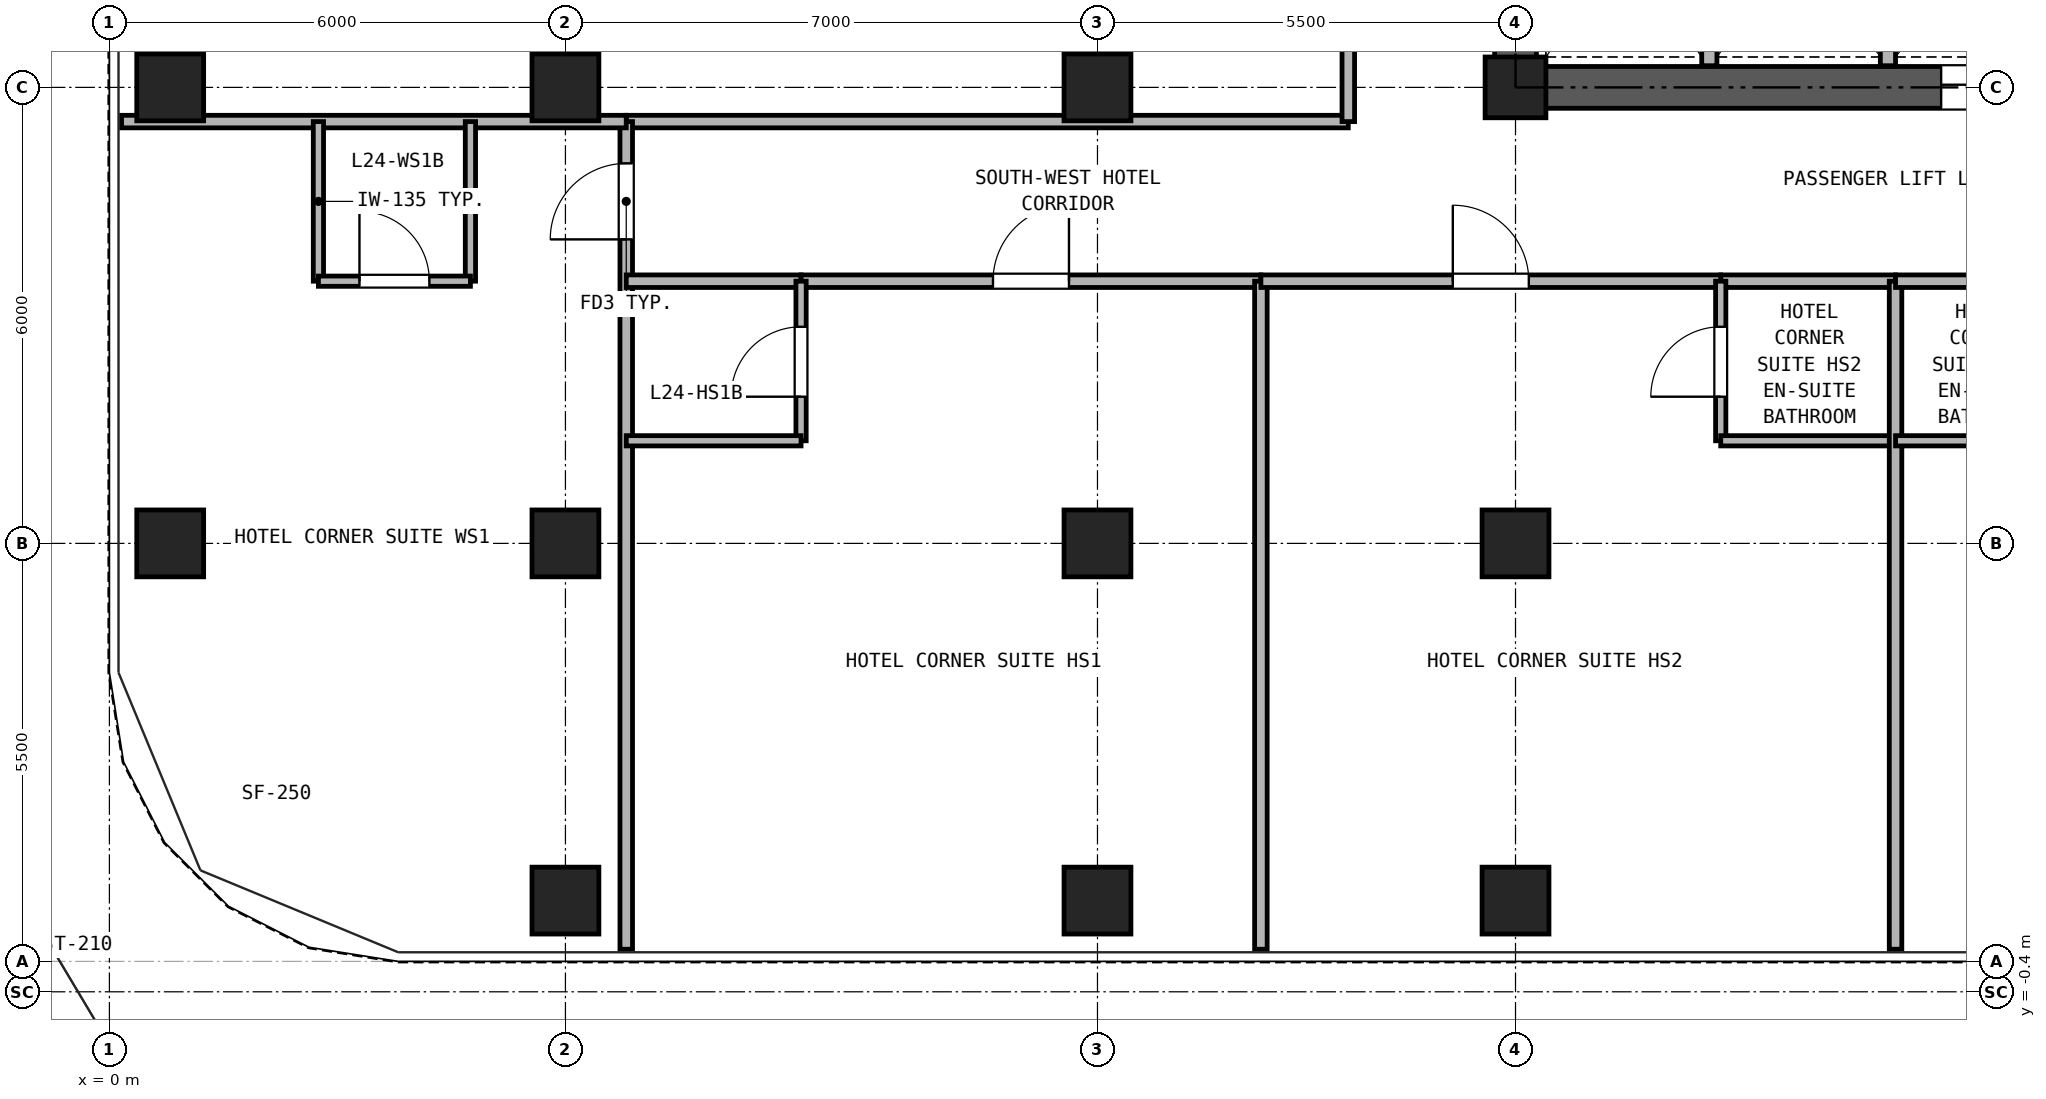
"""IFC4 building model, lengths in metres.
Left out: names, types, materials, properties, quantities, classifications, styles, units other than length and angle.
Written with IfcOpenShell. Run it as: python <this file> out.ifc"""

import sys

from ifc_helpers import new_model, si_unit, direction, frame, frame_2d, origin, origin_2d, place, context, subcontext, project, spatial, rectangle, hollow_rectangle, extrude, source, transform, mapped, element, fill, save


model = new_model("IFC4")
c1 = context("Model", 3, precision=1e-05, world=origin(), true_north=direction((0.0, 1.0)))
c2 = subcontext(c1, "Body", "Model", "MODEL_VIEW")
j1 = project(units=[si_unit("LENGTHUNIT", "METRE"), si_unit("PLANEANGLEUNIT", "RADIAN")], contexts=[c1])
p1 = place(None, origin())
s1 = spatial("IfcSite", under=j1, at=p1, CompositionType="ELEMENT")
p2 = place(p1, origin())
s2 = spatial("IfcBuilding", under=s1, at=p2, CompositionType="ELEMENT")
p3 = place(p2, frame((0.0, 0.0, 92.7)))
s3 = spatial("IfcBuildingStorey", under=s2, at=p3, CompositionType="ELEMENT", Elevation=92.7)
m1 = source(origin(), c2, "Body", "SweptSolid", [
    extrude(hollow_rectangle(XDim=0.88, YDim=0.88, WallThickness=0.05, at=origin_2d()), origin(), (0.0, 0.0, 1.0), 2.95),
])
for number, where, z_axis, x_axis in (
    (1, (6.0, 0.8, 0.0), (0.0, 0.0, 1.0), (1.0, 0.0, 0.0)),
    (2, (13.0, 0.8, 0.0), (0.0, 0.0, 1.0), (1.0, 0.0, 0.0)),
    (3, (18.5, 0.8, 0.0), (0.0, 0.0, 1.0), (1.0, 0.0, 0.0)),
    (4, (0.8, 5.5, 0.0), (0.0, 0.0, 1.0), (1.0, 0.0, 0.0)),
    (5, (0.8, 11.5, 0.0), (0.0, 0.0, 1.0), (1.0, 0.0, 0.0)),
    (6, (6.0, 5.5, 0.0), (0.0, 0.0, 1.0), (1.0, 0.0, 0.0)),
    (7, (6.0, 11.5, 0.0), (0.0, 0.0, 1.0), (1.0, 0.0, 0.0)),
    (8, (13.0, 5.5, 0.0), (0.0, 0.0, 1.0), (1.0, 0.0, 0.0)),
    (9, (13.0, 11.5, 0.0), (0.0, 0.0, 1.0), (1.0, 0.0, 0.0)),
    (10, (18.5, 5.5, 0.0), (0.0, 0.0, 1.0), (1.0, 0.0, 0.0)),
):
    element("IfcColumn", number, at=place(p3, frame(where, z_axis=z_axis, x_axis=x_axis)), inside=s3, PredefinedType="COLUMN", context=c2, shape_type="MappedRepresentation", body=[
        mapped(m1, transform((0.0, 0.0, 0.0), x_axis=(1.0, 0.0, 0.0), y_axis=(0.0, 1.0, 0.0), z_axis=(0.0, 0.0, 1.0), scale=1.0)),
    ])
m2 = source(origin(), c2, "Body", "SweptSolid", [
    extrude(hollow_rectangle(XDim=0.8, YDim=0.8, WallThickness=0.045, at=origin_2d()), origin(), (0.0, 0.0, 1.0), 2.95),
])
p4 = place(p3, frame((18.5, 11.5, 0.0), z_axis=(0.0, 0.0, 1.0), x_axis=(1.0, 0.0, 0.0)))
e11 = element("IfcColumn", 11, at=p4, inside=s3, PredefinedType="COLUMN", context=c2, shape_type="MappedRepresentation", body=[
    mapped(m2, transform((0.0, 0.0, 0.0), x_axis=(1.0, 0.0, 0.0), y_axis=(0.0, 1.0, 0.0), z_axis=(0.0, 0.0, 1.0), scale=1.0)),
])
p5 = place(p3, frame((18.225, 11.5, 0.0), z_axis=(0.0, 0.0, 1.0), x_axis=(1.0, 0.0, 0.0)))
e12 = element("IfcWall", 12, at=p5, inside=s3, PredefinedType="SHEAR", context=c2, shape_type="SweptSolid", body=[
    extrude(rectangle(XDim=10.55, YDim=0.55, at=frame_2d((5.275, 0.0))), origin(), (0.0, 0.0, 1.0), 2.95),
])
p6 = place(p5, frame((5.875, 0.0, 0.0)))
e13 = element("IfcOpeningElement", 13, at=p6, cuts=e12, PredefinedType="OPENING", context=c2, shape_type="SweptSolid", body=[
    extrude(rectangle(XDim=1.1, YDim=2.25, at=frame_2d((0.55, 1.125))), frame((0.0, 0.285, 0.0), z_axis=(0.0, -1.0, 0.0), x_axis=(1.0, 0.0, 0.0)), (0.0, 0.0, 1.0), 0.57),
])
p7 = place(p5, frame((8.275, 0.0, 0.0)))
e14 = element("IfcOpeningElement", 14, at=p7, cuts=e12, PredefinedType="OPENING", context=c2, shape_type="SweptSolid", body=[
    extrude(rectangle(XDim=1.1, YDim=2.25, at=frame_2d((0.55, 1.125))), frame((0.0, 0.285, 0.0), z_axis=(0.0, -1.0, 0.0), x_axis=(1.0, 0.0, 0.0)), (0.0, 0.0, 1.0), 0.57),
])
p8 = place(p3, frame((18.5, 11.775, 0.0), z_axis=(0.0, 0.0, 1.0), x_axis=(0.0, 1.0, 0.0)))
e15 = element("IfcWall", 15, at=p8, inside=s3, PredefinedType="SHEAR", context=c2, shape_type="SweptSolid", body=[
    extrude(rectangle(XDim=16.7, YDim=0.55, at=frame_2d((8.35, 0.0))), origin(), (0.0, 0.0, 1.0), 2.95),
])
p9 = place(p8, frame((7.375, 0.0, 0.0)))
e16 = element("IfcOpeningElement", 16, at=p9, cuts=e15, PredefinedType="OPENING", context=c2, shape_type="SweptSolid", body=[
    extrude(rectangle(XDim=1.15, YDim=2.2, at=frame_2d((0.575, 1.1))), frame((0.0, 0.285, 0.0), z_axis=(0.0, -1.0, 0.0), x_axis=(1.0, 0.0, 0.0)), (0.0, 0.0, 1.0), 0.57),
])
for number, where, z_axis, x_axis in (
    (17, (21.05, 11.785, 0.0), (0.0, 0.0, 1.0), (0.0, 1.0, 0.0)),
    (18, (23.4, 11.785, 0.0), (0.0, 0.0, 1.0), (0.0, 1.0, 0.0)),
):
    element("IfcWall", number, at=place(p3, frame(where, z_axis=z_axis, x_axis=x_axis)), inside=s3, PredefinedType="PARTITIONING", context=c2, shape_type="SweptSolid", body=[
        extrude(rectangle(XDim=3.215, YDim=0.2, at=frame_2d((1.607, 0.0))), origin(), (0.0, 0.0, 1.0), 2.95),
    ])
p10 = place(p3, frame((6.8, 11.05, 0.0), z_axis=(0.0, 0.0, 1.0), x_axis=(1.0, 0.0, 0.0)))
e19 = element("IfcWall", 19, at=p10, inside=s3, PredefinedType="PARTITIONING", context=c2, shape_type="SweptSolid", body=[
    extrude(rectangle(XDim=9.5, YDim=0.165, at=frame_2d((4.75, 0.0))), origin(), (0.0, 0.0, 1.0), 2.95),
])
p11 = place(p3, frame((16.3, 11.05, 0.0), z_axis=(0.0, 0.0, 1.0), x_axis=(0.0, 1.0, 0.0)))
e20 = element("IfcWall", 20, at=p11, inside=s3, PredefinedType="PARTITIONING", context=c2, shape_type="SweptSolid", body=[
    extrude(rectangle(XDim=18.25, YDim=0.165, at=frame_2d((9.125, 0.0))), origin(), (0.0, 0.0, 1.0), 2.95),
])
p12 = place(p11, frame((4.062, 0.0, 0.0)))
e21 = element("IfcOpeningElement", 21, at=p12, cuts=e20, PredefinedType="OPENING", context=c2, shape_type="SweptSolid", body=[
    extrude(rectangle(XDim=0.95, YDim=2.15, at=frame_2d((0.475, 1.075))), frame((0.0, 0.093, 0.0), z_axis=(0.0, -1.0, 0.0), x_axis=(1.0, 0.0, 0.0)), (0.0, 0.0, 1.0), 0.185),
])
p13 = place(p11, frame((13.187, 0.0, 0.0)))
e22 = element("IfcOpeningElement", 22, at=p13, cuts=e20, PredefinedType="OPENING", context=c2, shape_type="SweptSolid", body=[
    extrude(rectangle(XDim=0.95, YDim=2.15, at=frame_2d((0.475, 1.075))), frame((0.0, 0.093, 0.0), z_axis=(0.0, -1.0, 0.0), x_axis=(1.0, 0.0, 0.0)), (0.0, 0.0, 1.0), 0.185),
])
p14 = place(p3, frame((6.8, 0.16, 0.0), z_axis=(0.0, 0.0, 1.0), x_axis=(0.0, 1.0, 0.0)))
e23 = element("IfcWall", 23, at=p14, inside=s3, PredefinedType="PARTITIONING", context=c2, shape_type="SweptSolid", body=[
    extrude(rectangle(XDim=10.89, YDim=0.165, at=frame_2d((5.445, 0.0))), origin(), (0.0, 0.0, 1.0), 2.95),
])
p15 = place(p14, frame((9.34, 0.0, 0.0)))
e24 = element("IfcOpeningElement", 24, at=p15, cuts=e23, PredefinedType="OPENING", context=c2, shape_type="SweptSolid", body=[
    extrude(rectangle(XDim=1.0, YDim=2.15, at=frame_2d((0.5, 1.075))), frame((0.0, 0.093, 0.0), z_axis=(0.0, -1.0, 0.0), x_axis=(1.0, 0.0, 0.0)), (0.0, 0.0, 1.0), 0.185),
])
p16 = place(p3, frame((0.16, 11.05, 0.0), z_axis=(0.0, 0.0, 1.0), x_axis=(1.0, 0.0, 0.0)))
e25 = element("IfcWall", 25, at=p16, inside=s3, PredefinedType="PARTITIONING", context=c2, shape_type="SweptSolid", body=[
    extrude(rectangle(XDim=6.64, YDim=0.165, at=frame_2d((3.32, 0.0))), origin(), (0.0, 0.0, 1.0), 2.95),
])
for number, where, z_axis, x_axis in (
    (26, (2.75, 8.95, 0.0), (0.0, 0.0, 1.0), (0.0, 1.0, 0.0)),
    (27, (4.75, 8.95, 0.0), (0.0, 0.0, 1.0), (0.0, 1.0, 0.0)),
):
    element("IfcWall", number, at=place(p3, frame(where, z_axis=z_axis, x_axis=x_axis)), inside=s3, PredefinedType="PARTITIONING", context=c2, shape_type="SweptSolid", body=[
        extrude(rectangle(XDim=2.1, YDim=0.135, at=frame_2d((1.05, 0.0))), origin(), (0.0, 0.0, 1.0), 2.95),
    ])
p17 = place(p3, frame((2.75, 8.95, 0.0), z_axis=(0.0, 0.0, 1.0), x_axis=(1.0, 0.0, 0.0)))
e28 = element("IfcWall", 28, at=p17, inside=s3, PredefinedType="PARTITIONING", context=c2, shape_type="SweptSolid", body=[
    extrude(rectangle(XDim=2.0, YDim=0.135, at=frame_2d((1.0, 0.0))), origin(), (0.0, 0.0, 1.0), 2.95),
])
p18 = place(p17, frame((0.54, 0.0, 0.0)))
e29 = element("IfcOpeningElement", 29, at=p18, cuts=e28, PredefinedType="OPENING", context=c2, shape_type="SweptSolid", body=[
    extrude(rectangle(XDim=0.92, YDim=2.1, at=frame_2d((0.46, 1.05))), frame((0.0, 0.077, 0.0), z_axis=(0.0, -1.0, 0.0), x_axis=(1.0, 0.0, 0.0)), (0.0, 0.0, 1.0), 0.155),
])
p19 = place(p3, frame((6.8, 8.95, 0.0), z_axis=(0.0, 0.0, 1.0), x_axis=(1.0, 0.0, 0.0)))
e30 = element("IfcWall", 30, at=p19, inside=s3, PredefinedType="PARTITIONING", context=c2, shape_type="SweptSolid", body=[
    extrude(rectangle(XDim=2.3, YDim=0.165, at=frame_2d((1.15, 0.0))), origin(), (0.0, 0.0, 1.0), 2.95),
])
p20 = place(p3, frame((9.1, 8.95, 0.0), z_axis=(0.0, 0.0, 1.0), x_axis=(1.0, 0.0, 0.0)))
e31 = element("IfcWall", 31, at=p20, inside=s3, PredefinedType="PARTITIONING", context=c2, shape_type="SweptSolid", body=[
    extrude(rectangle(XDim=6.05, YDim=0.165, at=frame_2d((3.025, 0.0))), origin(), (0.0, 0.0, 1.0), 2.95),
])
p21 = place(p20, frame((2.525, 0.0, 0.0)))
e32 = element("IfcOpeningElement", 32, at=p21, cuts=e31, PredefinedType="OPENING", context=c2, shape_type="SweptSolid", body=[
    extrude(rectangle(XDim=1.0, YDim=2.15, at=frame_2d((0.5, 1.075))), frame((0.0, 0.093, 0.0), z_axis=(0.0, -1.0, 0.0), x_axis=(1.0, 0.0, 0.0)), (0.0, 0.0, 1.0), 0.185),
])
p22 = place(p3, frame((9.1, 6.85, 0.0), z_axis=(0.0, 0.0, 1.0), x_axis=(0.0, 1.0, 0.0)))
e33 = element("IfcWall", 33, at=p22, inside=s3, PredefinedType="PARTITIONING", context=c2, shape_type="SweptSolid", body=[
    extrude(rectangle(XDim=2.1, YDim=0.135, at=frame_2d((1.05, 0.0))), origin(), (0.0, 0.0, 1.0), 2.95),
])
p23 = place(p22, frame((0.58, 0.0, 0.0)))
e34 = element("IfcOpeningElement", 34, at=p23, cuts=e33, PredefinedType="OPENING", context=c2, shape_type="SweptSolid", body=[
    extrude(rectangle(XDim=0.92, YDim=2.1, at=frame_2d((0.46, 1.05))), frame((0.0, 0.077, 0.0), z_axis=(0.0, -1.0, 0.0), x_axis=(1.0, 0.0, 0.0)), (0.0, 0.0, 1.0), 0.155),
])
p24 = place(p3, frame((6.8, 6.85, 0.0), z_axis=(0.0, 0.0, 1.0), x_axis=(1.0, 0.0, 0.0)))
e35 = element("IfcWall", 35, at=p24, inside=s3, PredefinedType="PARTITIONING", context=c2, shape_type="SweptSolid", body=[
    extrude(rectangle(XDim=2.3, YDim=0.135, at=frame_2d((1.15, 0.0))), origin(), (0.0, 0.0, 1.0), 2.95),
])
p25 = place(p3, frame((15.15, 0.16, 0.0), z_axis=(0.0, 0.0, 1.0), x_axis=(0.0, 1.0, 0.0)))
e36 = element("IfcWall", 36, at=p25, inside=s3, PredefinedType="PARTITIONING", context=c2, shape_type="SweptSolid", body=[
    extrude(rectangle(XDim=8.79, YDim=0.165, at=frame_2d((4.395, 0.0))), origin(), (0.0, 0.0, 1.0), 2.95),
])
p26 = place(p3, frame((21.2, 8.95, 0.0), z_axis=(0.0, 0.0, 1.0), x_axis=(1.0, 0.0, 0.0)))
e37 = element("IfcWall", 37, at=p26, inside=s3, PredefinedType="PARTITIONING", context=c2, shape_type="SweptSolid", body=[
    extrude(rectangle(XDim=2.3, YDim=0.165, at=frame_2d((1.15, 0.0))), origin(), (0.0, 0.0, 1.0), 2.95),
])
p27 = place(p3, frame((15.15, 8.95, 0.0), z_axis=(0.0, 0.0, 1.0), x_axis=(1.0, 0.0, 0.0)))
e38 = element("IfcWall", 38, at=p27, inside=s3, PredefinedType="PARTITIONING", context=c2, shape_type="SweptSolid", body=[
    extrude(rectangle(XDim=6.05, YDim=0.165, at=frame_2d((3.025, 0.0))), origin(), (0.0, 0.0, 1.0), 2.95),
])
p28 = place(p27, frame((2.525, 0.0, 0.0)))
e39 = element("IfcOpeningElement", 39, at=p28, cuts=e38, PredefinedType="OPENING", context=c2, shape_type="SweptSolid", body=[
    extrude(rectangle(XDim=1.0, YDim=2.15, at=frame_2d((0.5, 1.075))), frame((0.0, 0.093, 0.0), z_axis=(0.0, -1.0, 0.0), x_axis=(1.0, 0.0, 0.0)), (0.0, 0.0, 1.0), 0.185),
])
p29 = place(p3, frame((21.2, 6.85, 0.0), z_axis=(0.0, 0.0, 1.0), x_axis=(0.0, 1.0, 0.0)))
e40 = element("IfcWall", 40, at=p29, inside=s3, PredefinedType="PARTITIONING", context=c2, shape_type="SweptSolid", body=[
    extrude(rectangle(XDim=2.1, YDim=0.135, at=frame_2d((1.05, 0.0))), origin(), (0.0, 0.0, 1.0), 2.95),
])
p30 = place(p29, frame((0.58, 0.0, 0.0)))
e41 = element("IfcOpeningElement", 41, at=p30, cuts=e40, PredefinedType="OPENING", context=c2, shape_type="SweptSolid", body=[
    extrude(rectangle(XDim=0.92, YDim=2.1, at=frame_2d((0.46, 1.05))), frame((0.0, 0.077, 0.0), z_axis=(0.0, -1.0, 0.0), x_axis=(1.0, 0.0, 0.0)), (0.0, 0.0, 1.0), 0.155),
])
p31 = place(p3, frame((21.2, 6.85, 0.0), z_axis=(0.0, 0.0, 1.0), x_axis=(1.0, 0.0, 0.0)))
e42 = element("IfcWall", 42, at=p31, inside=s3, PredefinedType="PARTITIONING", context=c2, shape_type="SweptSolid", body=[
    extrude(rectangle(XDim=2.3, YDim=0.135, at=frame_2d((1.15, 0.0))), origin(), (0.0, 0.0, 1.0), 2.95),
])
p32 = place(p3, frame((23.5, 0.16, 0.0), z_axis=(0.0, 0.0, 1.0), x_axis=(0.0, 1.0, 0.0)))
e43 = element("IfcWall", 43, at=p32, inside=s3, PredefinedType="PARTITIONING", context=c2, shape_type="SweptSolid", body=[
    extrude(rectangle(XDim=8.79, YDim=0.165, at=frame_2d((4.395, 0.0))), origin(), (0.0, 0.0, 1.0), 2.95),
])
p33 = place(p3, frame((23.5, 8.95, 0.0), z_axis=(0.0, 0.0, 1.0), x_axis=(1.0, 0.0, 0.0)))
e44 = element("IfcWall", 44, at=p33, inside=s3, PredefinedType="PARTITIONING", context=c2, shape_type="SweptSolid", body=[
    extrude(rectangle(XDim=2.3, YDim=0.165, at=frame_2d((1.15, 0.0))), origin(), (0.0, 0.0, 1.0), 2.95),
])
p34 = place(p3, frame((23.5, 6.85, 0.0), z_axis=(0.0, 0.0, 1.0), x_axis=(1.0, 0.0, 0.0)))
e45 = element("IfcWall", 45, at=p34, inside=s3, PredefinedType="PARTITIONING", context=c2, shape_type="SweptSolid", body=[
    extrude(rectangle(XDim=2.3, YDim=0.135, at=frame_2d((1.15, 0.0))), origin(), (0.0, 0.0, 1.0), 2.95),
])
p35 = place(p6, frame((1.1, 0.0, 0.0), z_axis=(0.0, 0.0, 1.0), x_axis=(-1.0, 0.0, 0.0)))
e46 = element("IfcDoor", 46, at=p35, inside=s3, OperationType="DOUBLE_DOOR_SLIDING", PredefinedType="DOOR", context=c2, shape_type="SweptSolid", body=[
    extrude(rectangle(XDim=1.1, YDim=2.25, at=frame_2d((0.55, 1.125))), frame((0.0, 0.025, 0.0), z_axis=(0.0, -1.0, 0.0), x_axis=(1.0, 0.0, 0.0)), (0.0, 0.0, 1.0), 0.05),
])
fill(e13, e46)
p36 = place(p18, origin())
e47 = element("IfcDoor", 47, at=p36, inside=s3, OperationType="SINGLE_SWING_LEFT", PredefinedType="DOOR", context=c2, shape_type="SweptSolid", body=[
    extrude(rectangle(XDim=0.92, YDim=2.1, at=frame_2d((0.46, 1.05))), frame((0.0, 0.025, 0.0), z_axis=(0.0, -1.0, 0.0), x_axis=(1.0, 0.0, 0.0)), (0.0, 0.0, 1.0), 0.05),
])
fill(e29, e47)
p37 = place(p15, origin())
e48 = element("IfcDoor", 48, at=p37, inside=s3, OperationType="SINGLE_SWING_LEFT", PredefinedType="DOOR", context=c2, shape_type="SweptSolid", body=[
    extrude(rectangle(XDim=1.0, YDim=2.15, at=frame_2d((0.5, 1.075))), frame((0.0, 0.025, 0.0), z_axis=(0.0, -1.0, 0.0), x_axis=(1.0, 0.0, 0.0)), (0.0, 0.0, 1.0), 0.05),
])
fill(e24, e48)
p38 = place(p23, frame((0.92, 0.0, 0.0), z_axis=(0.0, 0.0, 1.0), x_axis=(-1.0, 0.0, 0.0)))
e49 = element("IfcDoor", 49, at=p38, inside=s3, OperationType="SINGLE_SWING_LEFT", PredefinedType="DOOR", context=c2, shape_type="SweptSolid", body=[
    extrude(rectangle(XDim=0.92, YDim=2.1, at=frame_2d((0.46, 1.05))), frame((0.0, 0.025, 0.0), z_axis=(0.0, -1.0, 0.0), x_axis=(1.0, 0.0, 0.0)), (0.0, 0.0, 1.0), 0.05),
])
fill(e34, e49)
p39 = place(p21, frame((1.0, 0.0, 0.0), z_axis=(0.0, 0.0, 1.0), x_axis=(-1.0, 0.0, 0.0)))
e50 = element("IfcDoor", 50, at=p39, inside=s3, OperationType="SINGLE_SWING_RIGHT", PredefinedType="DOOR", context=c2, shape_type="SweptSolid", body=[
    extrude(rectangle(XDim=1.0, YDim=2.15, at=frame_2d((0.5, 1.075))), frame((0.0, 0.025, 0.0), z_axis=(0.0, -1.0, 0.0), x_axis=(1.0, 0.0, 0.0)), (0.0, 0.0, 1.0), 0.05),
])
fill(e32, e50)
p40 = place(p30, origin())
e51 = element("IfcDoor", 51, at=p40, inside=s3, OperationType="SINGLE_SWING_LEFT", PredefinedType="DOOR", context=c2, shape_type="SweptSolid", body=[
    extrude(rectangle(XDim=0.92, YDim=2.1, at=frame_2d((0.46, 1.05))), frame((0.0, 0.025, 0.0), z_axis=(0.0, -1.0, 0.0), x_axis=(1.0, 0.0, 0.0)), (0.0, 0.0, 1.0), 0.05),
])
fill(e41, e51)
p41 = place(p28, frame((1.0, 0.0, 0.0), z_axis=(0.0, 0.0, 1.0), x_axis=(-1.0, 0.0, 0.0)))
e52 = element("IfcDoor", 52, at=p41, inside=s3, OperationType="SINGLE_SWING_LEFT", PredefinedType="DOOR", context=c2, shape_type="SweptSolid", body=[
    extrude(rectangle(XDim=1.0, YDim=2.15, at=frame_2d((0.5, 1.075))), frame((0.0, 0.025, 0.0), z_axis=(0.0, -1.0, 0.0), x_axis=(1.0, 0.0, 0.0)), (0.0, 0.0, 1.0), 0.05),
])
fill(e39, e52)
save(model, sys.argv[1])
